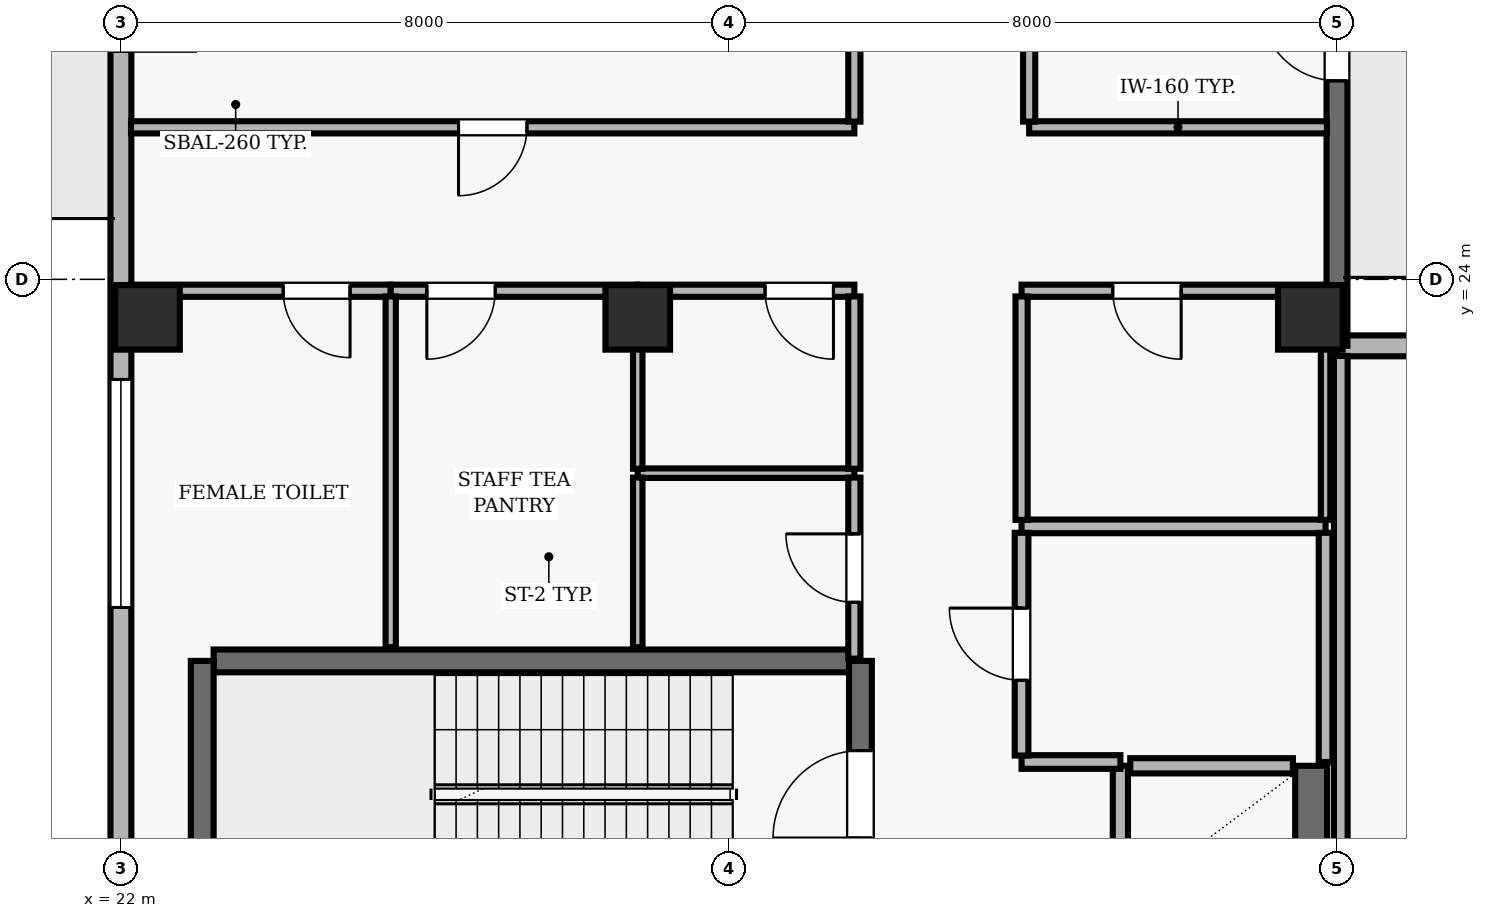
"""IFC4 building model, lengths in metres.
Left out: names, types, materials, properties, quantities, classifications, styles, units other than length and angle.
Written with IfcOpenShell. Run it as: python <this file> out.ifc"""

import sys

from ifc_helpers import new_model, si_unit, direction, frame, frame_2d, origin, origin_2d, place, context, subcontext, project, spatial, rectangle, extrude, element, fill, save


model = new_model("IFC4")
c1 = context("Model", 3, precision=1e-05, world=origin(), true_north=direction((0.0, 1.0)))
c2 = subcontext(c1, "Body", "Model", "MODEL_VIEW")
j1 = project(units=[si_unit("LENGTHUNIT", "METRE"), si_unit("PLANEANGLEUNIT", "RADIAN")], contexts=[c1])
p1 = place(None, origin())
s1 = spatial("IfcSite", under=j1, at=p1, CompositionType="ELEMENT")
p2 = place(p1, origin())
s2 = spatial("IfcBuilding", under=s1, at=p2, CompositionType="ELEMENT")
p3 = place(p2, frame((0.0, 0.0, 243.2)))
s3 = spatial("IfcBuildingStorey", under=s2, at=p3, CompositionType="ELEMENT", Elevation=243.2)
for number, where, z_axis, x_axis in (
    (1, (22.35, 23.5, 0.0), (0.0, 0.0, 1.0), (1.0, 0.0, 0.0)),
    (2, (28.8, 23.5, 0.0), (0.0, 0.0, 1.0), (1.0, 0.0, 0.0)),
    (3, (37.65, 23.5, 0.0), (0.0, 0.0, 1.0), (1.0, 0.0, 0.0)),
):
    element("IfcColumn", number, at=place(p3, frame(where, z_axis=z_axis, x_axis=x_axis)), inside=s3, PredefinedType="COLUMN", context=c2, shape_type="SweptSolid", body=[
        extrude(rectangle(XDim=0.85, YDim=0.85, at=origin_2d()), origin(), (0.0, 0.0, 1.0), 5.0),
    ])
p4 = place(p3, frame((46.3, 23.125, 0.0), z_axis=(0.0, 0.0, 1.0), x_axis=(-1.0, 0.0, 0.0)))
e4 = element("IfcWall", 4, at=p4, inside=s3, PredefinedType="SOLIDWALL", context=c2, shape_type="SweptSolid", body=[
    extrude(rectangle(XDim=8.3, YDim=0.275, at=frame_2d((4.15, 0.0))), origin(), (0.0, 0.0, 1.0), 4.79),
])
p5 = place(p4, frame((3.25, 0.0, 0.9)))
e5 = element("IfcOpeningElement", 5, at=p5, cuts=e4, PredefinedType="OPENING", context=c2, shape_type="SweptSolid", body=[
    extrude(rectangle(XDim=1.8, YDim=1.8, at=frame_2d((0.9, 0.9))), frame((0.0, 0.147, 0.0), z_axis=(0.0, -1.0, 0.0), x_axis=(1.0, 0.0, 0.0)), (0.0, 0.0, 1.0), 0.295),
])
p6 = place(p3, frame((38.0, 23.125, 0.0), z_axis=(0.0, 0.0, 1.0), x_axis=(0.0, 1.0, 0.0)))
e6 = element("IfcWall", 6, at=p6, inside=s3, PredefinedType="SOLIDWALL", context=c2, shape_type="SweptSolid", body=[
    extrude(rectangle(XDim=12.175, YDim=0.275, at=frame_2d((6.087, 0.0))), origin(), (0.0, 0.0, 1.0), 4.79),
])
p7 = place(p6, frame((3.487, 0.0, 0.0)))
e7 = element("IfcOpeningElement", 7, at=p7, cuts=e6, PredefinedType="OPENING", context=c2, shape_type="SweptSolid", body=[
    extrude(rectangle(XDim=1.0, YDim=2.2, at=frame_2d((0.5, 1.1))), frame((0.0, 0.147, 0.0), z_axis=(0.0, -1.0, 0.0), x_axis=(1.0, 0.0, 0.0)), (0.0, 0.0, 1.0), 0.295),
])
p8 = place(p3, frame((22.0, 35.3, 0.0), z_axis=(0.0, 0.0, 1.0), x_axis=(0.0, -1.0, 0.0)))
e8 = element("IfcWall", 8, at=p8, inside=s3, PredefinedType="SOLIDWALL", context=c2, shape_type="SweptSolid", body=[
    extrude(rectangle(XDim=32.8, YDim=0.275, at=frame_2d((16.4, 0.0))), origin(), (0.0, 0.0, 1.0), 4.79),
])
p9 = place(p8, frame((7.3, 0.0, 0.0)))
e9 = element("IfcOpeningElement", 9, at=p9, cuts=e8, PredefinedType="OPENING", context=c2, shape_type="SweptSolid", body=[
    extrude(rectangle(XDim=1.0, YDim=2.2, at=frame_2d((0.5, 1.1))), frame((0.0, 0.147, 0.0), z_axis=(0.0, -1.0, 0.0), x_axis=(1.0, 0.0, 0.0)), (0.0, 0.0, 1.0), 0.295),
])
p10 = place(p8, frame((12.617, 0.0, 0.9)))
e10 = element("IfcOpeningElement", 10, at=p10, cuts=e8, PredefinedType="OPENING", context=c2, shape_type="SweptSolid", body=[
    extrude(rectangle(XDim=3.0, YDim=2.2, at=frame_2d((1.5, 1.1))), frame((0.0, 0.147, 0.0), z_axis=(0.0, -1.0, 0.0), x_axis=(1.0, 0.0, 0.0)), (0.0, 0.0, 1.0), 0.295),
])
p11 = place(p8, frame((23.1, 0.0, 0.9)))
e11 = element("IfcOpeningElement", 11, at=p11, cuts=e8, PredefinedType="OPENING", context=c2, shape_type="SweptSolid", body=[
    extrude(rectangle(XDim=3.0, YDim=2.2, at=frame_2d((1.5, 1.1))), frame((0.0, 0.147, 0.0), z_axis=(0.0, -1.0, 0.0), x_axis=(1.0, 0.0, 0.0)), (0.0, 0.0, 1.0), 0.295),
])
p12 = place(p3, frame((31.58, 18.98, 0.0), z_axis=(0.0, 0.0, 1.0), x_axis=(-1.0, 0.0, 0.0)))
e12 = element("IfcWall", 12, at=p12, inside=s3, PredefinedType="SHEAR", context=c2, shape_type="SweptSolid", body=[
    extrude(rectangle(XDim=8.36, YDim=0.3, at=frame_2d((4.18, 0.0))), origin(), (0.0, 0.0, 1.0), 4.79),
])
p13 = place(p3, frame((23.07, 18.98, 0.0), z_axis=(0.0, 0.0, 1.0), x_axis=(0.0, -1.0, 0.0)))
e13 = element("IfcWall", 13, at=p13, inside=s3, PredefinedType="SHEAR", context=c2, shape_type="SweptSolid", body=[
    extrude(rectangle(XDim=3.51, YDim=0.3, at=frame_2d((1.755, 0.0))), origin(), (0.0, 0.0, 1.0), 4.79),
])
p14 = place(p3, frame((31.73, 15.47, 0.0), z_axis=(0.0, 0.0, 1.0), x_axis=(0.0, 1.0, 0.0)))
e14 = element("IfcWall", 14, at=p14, inside=s3, PredefinedType="SHEAR", context=c2, shape_type="SweptSolid", body=[
    extrude(rectangle(XDim=3.51, YDim=0.3, at=frame_2d((1.755, 0.0))), origin(), (0.0, 0.0, 1.0), 4.79),
])
p15 = place(p14, frame((1.18, 0.0, 0.0)))
e15 = element("IfcOpeningElement", 15, at=p15, cuts=e14, PredefinedType="OPENING", context=c2, shape_type="SweptSolid", body=[
    extrude(rectangle(XDim=1.15, YDim=2.15, at=frame_2d((0.575, 1.075))), frame((0.0, 0.16, 0.0), z_axis=(0.0, -1.0, 0.0), x_axis=(1.0, 0.0, 0.0)), (0.0, 0.0, 1.0), 0.32),
])
p16 = place(p3, frame((35.15, 17.6, 0.0), z_axis=(0.0, 0.0, 1.0), x_axis=(0.0, -1.0, 0.0)))
e16 = element("IfcWall", 16, at=p16, inside=s3, PredefinedType="SOLIDWALL", context=c2, shape_type="SweptSolid", body=[
    extrude(rectangle(XDim=1.85, YDim=0.2, at=frame_2d((0.925, 0.0))), origin(), (0.0, 0.0, 1.0), 4.79),
])
p17 = place(p3, frame((37.66, 15.75, 0.0), z_axis=(0.0, 0.0, 1.0), x_axis=(0.0, 1.0, 0.0)))
e17 = element("IfcWall", 17, at=p17, inside=s3, PredefinedType="SHEAR", context=c2, shape_type="SweptSolid", body=[
    extrude(rectangle(XDim=1.85, YDim=0.42, at=frame_2d((0.925, 0.0))), origin(), (0.0, 0.0, 1.0), 4.79),
])
p18 = place(p3, frame((37.42, 17.6, 0.0), z_axis=(0.0, 0.0, 1.0), x_axis=(-1.0, 0.0, 0.0)))
e18 = element("IfcWall", 18, at=p18, inside=s3, PredefinedType="SOLIDWALL", context=c2, shape_type="SweptSolid", body=[
    extrude(rectangle(XDim=2.14, YDim=0.2, at=frame_2d((1.07, 0.0))), origin(), (0.0, 0.0, 1.0), 4.79),
])
p19 = place(p3, frame((25.55, 23.85, 0.0), z_axis=(0.0, 0.0, 1.0), x_axis=(-1.0, 0.0, 0.0)))
e19 = element("IfcWall", 19, at=p19, inside=s3, PredefinedType="PARTITIONING", context=c2, shape_type="SweptSolid", body=[
    extrude(rectangle(XDim=3.35, YDim=0.16, at=frame_2d((1.675, 0.0))), origin(), (0.0, 0.0, 1.0), 4.327),
])
p20 = place(p19, frame((0.535, 0.0, 0.0)))
e20 = element("IfcOpeningElement", 20, at=p20, cuts=e19, PredefinedType="OPENING", context=c2, shape_type="SweptSolid", body=[
    extrude(rectangle(XDim=0.88, YDim=2.1, at=frame_2d((0.44, 1.05))), frame((0.0, 0.09, 0.0), z_axis=(0.0, -1.0, 0.0), x_axis=(1.0, 0.0, 0.0)), (0.0, 0.0, 1.0), 0.18),
])
p21 = place(p3, frame((28.8, 23.85, 0.0), z_axis=(0.0, 0.0, 1.0), x_axis=(-1.0, 0.0, 0.0)))
e21 = element("IfcWall", 21, at=p21, inside=s3, PredefinedType="PARTITIONING", context=c2, shape_type="SweptSolid", body=[
    extrude(rectangle(XDim=3.25, YDim=0.16, at=frame_2d((1.625, 0.0))), origin(), (0.0, 0.0, 1.0), 4.327),
])
p22 = place(p21, frame((1.875, 0.0, 0.0)))
e22 = element("IfcOpeningElement", 22, at=p22, cuts=e21, PredefinedType="OPENING", context=c2, shape_type="SweptSolid", body=[
    extrude(rectangle(XDim=0.9, YDim=2.1, at=frame_2d((0.45, 1.05))), frame((0.0, 0.09, 0.0), z_axis=(0.0, -1.0, 0.0), x_axis=(1.0, 0.0, 0.0)), (0.0, 0.0, 1.0), 0.18),
])
p23 = place(p3, frame((31.65, 21.45, 0.0), z_axis=(0.0, 0.0, 1.0), x_axis=(-1.0, 0.0, 0.0)))
e23 = element("IfcWall", 23, at=p23, inside=s3, PredefinedType="PARTITIONING", context=c2, shape_type="SweptSolid", body=[
    extrude(rectangle(XDim=2.85, YDim=0.125, at=frame_2d((1.425, 0.0))), origin(), (0.0, 0.0, 1.0), 4.79),
])
p24 = place(p3, frame((31.65, 23.85, 0.0), z_axis=(0.0, 0.0, 1.0), x_axis=(-1.0, 0.0, 0.0)))
e24 = element("IfcWall", 24, at=p24, inside=s3, PredefinedType="PARTITIONING", context=c2, shape_type="SweptSolid", body=[
    extrude(rectangle(XDim=2.85, YDim=0.16, at=frame_2d((1.425, 0.0))), origin(), (0.0, 0.0, 1.0), 4.327),
])
p25 = place(p24, frame((0.275, 0.0, 0.0)))
e25 = element("IfcOpeningElement", 25, at=p25, cuts=e24, PredefinedType="OPENING", context=c2, shape_type="SweptSolid", body=[
    extrude(rectangle(XDim=0.9, YDim=2.1, at=frame_2d((0.45, 1.05))), frame((0.0, 0.09, 0.0), z_axis=(0.0, -1.0, 0.0), x_axis=(1.0, 0.0, 0.0)), (0.0, 0.0, 1.0), 0.18),
])
p26 = place(p3, frame((31.65, 26.0, 0.0), z_axis=(0.0, 0.0, 1.0), x_axis=(-1.0, 0.0, 0.0)))
e26 = element("IfcWall", 26, at=p26, inside=s3, PredefinedType="PARTITIONING", context=c2, shape_type="SweptSolid", body=[
    extrude(rectangle(XDim=9.517, YDim=0.16, at=frame_2d((4.758, 0.0))), origin(), (0.0, 0.0, 1.0), 4.79),
])
p27 = place(p26, frame((4.308, 0.0, 0.0)))
e27 = element("IfcOpeningElement", 27, at=p27, cuts=e26, PredefinedType="OPENING", context=c2, shape_type="SweptSolid", body=[
    extrude(rectangle(XDim=0.9, YDim=2.1, at=frame_2d((0.45, 1.05))), frame((0.0, 0.09, 0.0), z_axis=(0.0, -1.0, 0.0), x_axis=(1.0, 0.0, 0.0)), (0.0, 0.0, 1.0), 0.18),
])
p28 = place(p3, frame((33.85, 17.65, 0.0), z_axis=(0.0, 0.0, 1.0), x_axis=(1.0, 0.0, 0.0)))
e28 = element("IfcWall", 28, at=p28, inside=s3, PredefinedType="PARTITIONING", context=c2, shape_type="SweptSolid", body=[
    extrude(rectangle(XDim=1.3, YDim=0.18, at=frame_2d((0.65, 0.0))), origin(), (0.0, 0.0, 1.0), 4.79),
])
p29 = place(p3, frame((37.85, 20.75, 0.0), z_axis=(0.0, 0.0, 1.0), x_axis=(-1.0, 0.0, 0.0)))
e29 = element("IfcWall", 29, at=p29, inside=s3, PredefinedType="PARTITIONING", context=c2, shape_type="SweptSolid", body=[
    extrude(rectangle(XDim=4.0, YDim=0.18, at=frame_2d((2.0, 0.0))), origin(), (0.0, 0.0, 1.0), 4.79),
])
p30 = place(p3, frame((37.85, 23.85, 0.0), z_axis=(0.0, 0.0, 1.0), x_axis=(-1.0, 0.0, 0.0)))
e30 = element("IfcWall", 30, at=p30, inside=s3, PredefinedType="PARTITIONING", context=c2, shape_type="SweptSolid", body=[
    extrude(rectangle(XDim=4.0, YDim=0.16, at=frame_2d((2.0, 0.0))), origin(), (0.0, 0.0, 1.0), 4.327),
])
p31 = place(p30, frame((1.9, 0.0, 0.0)))
e31 = element("IfcOpeningElement", 31, at=p31, cuts=e30, PredefinedType="OPENING", context=c2, shape_type="SweptSolid", body=[
    extrude(rectangle(XDim=0.9, YDim=2.1, at=frame_2d((0.45, 1.05))), frame((0.0, 0.09, 0.0), z_axis=(0.0, -1.0, 0.0), x_axis=(1.0, 0.0, 0.0)), (0.0, 0.0, 1.0), 0.18),
])
p32 = place(p3, frame((37.867, 26.0, 0.0), z_axis=(0.0, 0.0, 1.0), x_axis=(-1.0, 0.0, 0.0)))
e32 = element("IfcWall", 32, at=p32, inside=s3, PredefinedType="PARTITIONING", context=c2, shape_type="SweptSolid", body=[
    extrude(rectangle(XDim=3.917, YDim=0.16, at=frame_2d((1.958, 0.0))), origin(), (0.0, 0.0, 1.0), 4.79),
])
p33 = place(p3, frame((25.55, 19.16, 0.0), z_axis=(0.0, 0.0, 1.0), x_axis=(0.0, 1.0, 0.0)))
e33 = element("IfcWall", 33, at=p33, inside=s3, PredefinedType="PARTITIONING", context=c2, shape_type="SweptSolid", body=[
    extrude(rectangle(XDim=4.615, YDim=0.135, at=frame_2d((2.308, 0.0))), origin(), (0.0, 0.0, 1.0), 4.79),
])
p34 = place(p3, frame((28.8, 21.392, 0.0), z_axis=(0.0, 0.0, 1.0), x_axis=(0.0, -1.0, 0.0)))
e34 = element("IfcWall", 34, at=p34, inside=s3, PredefinedType="PARTITIONING", context=c2, shape_type="SweptSolid", body=[
    extrude(rectangle(XDim=2.232, YDim=0.125, at=frame_2d((1.116, 0.0))), origin(), (0.0, 0.0, 1.0), 4.79),
])
p35 = place(p3, frame((28.8, 23.775, 0.0), z_axis=(0.0, 0.0, 1.0), x_axis=(0.0, -1.0, 0.0)))
e35 = element("IfcWall", 35, at=p35, inside=s3, PredefinedType="PARTITIONING", context=c2, shape_type="SweptSolid", body=[
    extrude(rectangle(XDim=2.267, YDim=0.125, at=frame_2d((1.133, 0.0))), origin(), (0.0, 0.0, 1.0), 4.79),
])
p36 = place(p3, frame((31.65, 19.01, 0.0), z_axis=(0.0, 0.0, 1.0), x_axis=(0.0, 1.0, 0.0)))
e36 = element("IfcWall", 36, at=p36, inside=s3, PredefinedType="PARTITIONING", context=c2, shape_type="SweptSolid", body=[
    extrude(rectangle(XDim=2.382, YDim=0.16, at=frame_2d((1.191, 0.0))), origin(), (0.0, 0.0, 1.0), 4.79),
])
p37 = place(p36, frame((0.741, 0.0, 0.0)))
e37 = element("IfcOpeningElement", 37, at=p37, cuts=e36, PredefinedType="OPENING", context=c2, shape_type="SweptSolid", body=[
    extrude(rectangle(XDim=0.9, YDim=2.1, at=frame_2d((0.45, 1.05))), frame((0.0, 0.09, 0.0), z_axis=(0.0, -1.0, 0.0), x_axis=(1.0, 0.0, 0.0)), (0.0, 0.0, 1.0), 0.18),
])
p38 = place(p3, frame((31.65, 23.775, 0.0), z_axis=(0.0, 0.0, 1.0), x_axis=(0.0, -1.0, 0.0)))
e38 = element("IfcWall", 38, at=p38, inside=s3, PredefinedType="PARTITIONING", context=c2, shape_type="SweptSolid", body=[
    extrude(rectangle(XDim=2.267, YDim=0.16, at=frame_2d((1.133, 0.0))), origin(), (0.0, 0.0, 1.0), 4.79),
])
p39 = place(p3, frame((31.65, 31.442, 0.0), z_axis=(0.0, 0.0, 1.0), x_axis=(0.0, -1.0, 0.0)))
e39 = element("IfcWall", 39, at=p39, inside=s3, PredefinedType="PARTITIONING", context=c2, shape_type="SweptSolid", body=[
    extrude(rectangle(XDim=5.367, YDim=0.16, at=frame_2d((2.684, 0.0))), origin(), (0.0, 0.0, 1.0), 4.79),
])
p40 = place(p3, frame((33.85, 17.735, 0.0), z_axis=(0.0, 0.0, 1.0), x_axis=(0.0, 1.0, 0.0)))
e40 = element("IfcWall", 40, at=p40, inside=s3, PredefinedType="PARTITIONING", context=c2, shape_type="SweptSolid", body=[
    extrude(rectangle(XDim=2.93, YDim=0.18, at=frame_2d((1.465, 0.0))), origin(), (0.0, 0.0, 1.0), 4.79),
])
p41 = place(p40, frame((0.99, 0.0, 0.0)))
e41 = element("IfcOpeningElement", 41, at=p41, cuts=e40, PredefinedType="OPENING", context=c2, shape_type="SweptSolid", body=[
    extrude(rectangle(XDim=0.95, YDim=2.1, at=frame_2d((0.475, 1.05))), frame((0.0, 0.1, 0.0), z_axis=(0.0, -1.0, 0.0), x_axis=(1.0, 0.0, 0.0)), (0.0, 0.0, 1.0), 0.2),
])
p42 = place(p3, frame((33.85, 20.835, 0.0), z_axis=(0.0, 0.0, 1.0), x_axis=(0.0, 1.0, 0.0)))
e42 = element("IfcWall", 42, at=p42, inside=s3, PredefinedType="PARTITIONING", context=c2, shape_type="SweptSolid", body=[
    extrude(rectangle(XDim=2.94, YDim=0.16, at=frame_2d((1.47, 0.0))), origin(), (0.0, 0.0, 1.0), 4.79),
])
p43 = place(p3, frame((33.95, 26.075, 0.0), z_axis=(0.0, 0.0, 1.0), x_axis=(0.0, 1.0, 0.0)))
e43 = element("IfcWall", 43, at=p43, inside=s3, PredefinedType="PARTITIONING", context=c2, shape_type="SweptSolid", body=[
    extrude(rectangle(XDim=5.367, YDim=0.16, at=frame_2d((2.684, 0.0))), origin(), (0.0, 0.0, 1.0), 4.79),
])
p44 = place(p43, frame((2.234, 0.0, 0.0)))
e44 = element("IfcOpeningElement", 44, at=p44, cuts=e43, PredefinedType="OPENING", context=c2, shape_type="SweptSolid", body=[
    extrude(rectangle(XDim=0.9, YDim=2.1, at=frame_2d((0.45, 1.05))), frame((0.0, 0.09, 0.0), z_axis=(0.0, -1.0, 0.0), x_axis=(1.0, 0.0, 0.0)), (0.0, 0.0, 1.0), 0.18),
])
p45 = place(p3, frame((37.85, 17.65, 0.0), z_axis=(0.0, 0.0, 1.0), x_axis=(0.0, 1.0, 0.0)))
e45 = element("IfcWall", 45, at=p45, inside=s3, PredefinedType="PARTITIONING", context=c2, shape_type="SweptSolid", body=[
    extrude(rectangle(XDim=3.015, YDim=0.18, at=frame_2d((1.508, 0.0))), origin(), (0.0, 0.0, 1.0), 4.327),
])
p46 = place(p3, frame((37.85, 20.835, 0.0), z_axis=(0.0, 0.0, 1.0), x_axis=(0.0, 1.0, 0.0)))
e46 = element("IfcWall", 46, at=p46, inside=s3, PredefinedType="PARTITIONING", context=c2, shape_type="SweptSolid", body=[
    extrude(rectangle(XDim=2.29, YDim=0.125, at=frame_2d((1.145, 0.0))), origin(), (0.0, 0.0, 1.0), 4.327),
])
p47 = place(p3, frame((38.05, 22.992, 0.0), z_axis=(0.0, 0.0, 1.0), x_axis=(0.0, -1.0, 0.0)))
e47 = element("IfcWall", 47, at=p47, inside=s3, PredefinedType="PARTITIONING", context=c2, shape_type="SweptSolid", body=[
    extrude(rectangle(XDim=6.917, YDim=0.18, at=frame_2d((3.458, 0.0))), origin(), (0.0, 0.0, 1.0), 4.327),
])
p48 = place(p7, origin())
e48 = element("IfcDoor", 48, at=p48, inside=s3, OperationType="SINGLE_SWING_RIGHT", PredefinedType="DOOR", context=c2, shape_type="SweptSolid", body=[
    extrude(rectangle(XDim=1.0, YDim=2.2, at=frame_2d((0.5, 1.1))), frame((0.0, 0.025, 0.0), z_axis=(0.0, -1.0, 0.0), x_axis=(1.0, 0.0, 0.0)), (0.0, 0.0, 1.0), 0.05),
])
fill(e7, e48)
p49 = place(p10, origin())
e49 = element("IfcWindow", 49, at=p49, inside=s3, PartitioningType="SINGLE_PANEL", PredefinedType="WINDOW", context=c2, shape_type="SweptSolid", body=[
    extrude(rectangle(XDim=3.0, YDim=2.2, at=frame_2d((1.5, 1.1))), frame((0.0, 0.03, 0.0), z_axis=(0.0, -1.0, 0.0), x_axis=(1.0, 0.0, 0.0)), (0.0, 0.0, 1.0), 0.06),
])
fill(e10, e49)
p50 = place(p15, origin())
e50 = element("IfcDoor", 50, at=p50, inside=s3, OperationType="SINGLE_SWING_LEFT", PredefinedType="DOOR", context=c2, shape_type="SweptSolid", body=[
    extrude(rectangle(XDim=1.15, YDim=2.15, at=frame_2d((0.575, 1.075))), frame((0.0, 0.025, 0.0), z_axis=(0.0, -1.0, 0.0), x_axis=(1.0, 0.0, 0.0)), (0.0, 0.0, 1.0), 0.05),
])
fill(e15, e50)
p51 = place(p41, origin())
e51 = element("IfcDoor", 51, at=p51, inside=s3, OperationType="SINGLE_SWING_RIGHT", PredefinedType="DOOR", context=c2, shape_type="SweptSolid", body=[
    extrude(rectangle(XDim=0.95, YDim=2.1, at=frame_2d((0.475, 1.05))), frame((0.0, 0.025, 0.0), z_axis=(0.0, -1.0, 0.0), x_axis=(1.0, 0.0, 0.0)), (0.0, 0.0, 1.0), 0.05),
])
fill(e41, e51)
p52 = place(p31, origin())
e52 = element("IfcDoor", 52, at=p52, inside=s3, OperationType="SINGLE_SWING_LEFT", PredefinedType="DOOR", context=c2, shape_type="SweptSolid", body=[
    extrude(rectangle(XDim=0.9, YDim=2.1, at=frame_2d((0.45, 1.05))), frame((0.0, 0.025, 0.0), z_axis=(0.0, -1.0, 0.0), x_axis=(1.0, 0.0, 0.0)), (0.0, 0.0, 1.0), 0.05),
])
fill(e31, e52)
p53 = place(p37, origin())
e53 = element("IfcDoor", 53, at=p53, inside=s3, OperationType="SINGLE_SWING_RIGHT", PredefinedType="DOOR", context=c2, shape_type="SweptSolid", body=[
    extrude(rectangle(XDim=0.9, YDim=2.1, at=frame_2d((0.45, 1.05))), frame((0.0, 0.025, 0.0), z_axis=(0.0, -1.0, 0.0), x_axis=(1.0, 0.0, 0.0)), (0.0, 0.0, 1.0), 0.05),
])
fill(e37, e53)
p54 = place(p25, origin())
e54 = element("IfcDoor", 54, at=p54, inside=s3, OperationType="SINGLE_SWING_LEFT", PredefinedType="DOOR", context=c2, shape_type="SweptSolid", body=[
    extrude(rectangle(XDim=0.9, YDim=2.1, at=frame_2d((0.45, 1.05))), frame((0.0, 0.025, 0.0), z_axis=(0.0, -1.0, 0.0), x_axis=(1.0, 0.0, 0.0)), (0.0, 0.0, 1.0), 0.05),
])
fill(e25, e54)
p55 = place(p20, origin())
e55 = element("IfcDoor", 55, at=p55, inside=s3, OperationType="SINGLE_SWING_LEFT", PredefinedType="DOOR", context=c2, shape_type="SweptSolid", body=[
    extrude(rectangle(XDim=0.88, YDim=2.1, at=frame_2d((0.44, 1.05))), frame((0.0, 0.025, 0.0), z_axis=(0.0, -1.0, 0.0), x_axis=(1.0, 0.0, 0.0)), (0.0, 0.0, 1.0), 0.05),
])
fill(e20, e55)
p56 = place(p22, origin())
e56 = element("IfcDoor", 56, at=p56, inside=s3, OperationType="SINGLE_SWING_RIGHT", PredefinedType="DOOR", context=c2, shape_type="SweptSolid", body=[
    extrude(rectangle(XDim=0.9, YDim=2.1, at=frame_2d((0.45, 1.05))), frame((0.0, 0.025, 0.0), z_axis=(0.0, -1.0, 0.0), x_axis=(1.0, 0.0, 0.0)), (0.0, 0.0, 1.0), 0.05),
])
fill(e22, e56)
p57 = place(p27, origin())
e57 = element("IfcDoor", 57, at=p57, inside=s3, OperationType="SINGLE_SWING_RIGHT", PredefinedType="DOOR", context=c2, shape_type="SweptSolid", body=[
    extrude(rectangle(XDim=0.9, YDim=2.1, at=frame_2d((0.45, 1.05))), frame((0.0, 0.025, 0.0), z_axis=(0.0, -1.0, 0.0), x_axis=(1.0, 0.0, 0.0)), (0.0, 0.0, 1.0), 0.05),
])
fill(e27, e57)
save(model, sys.argv[1])
